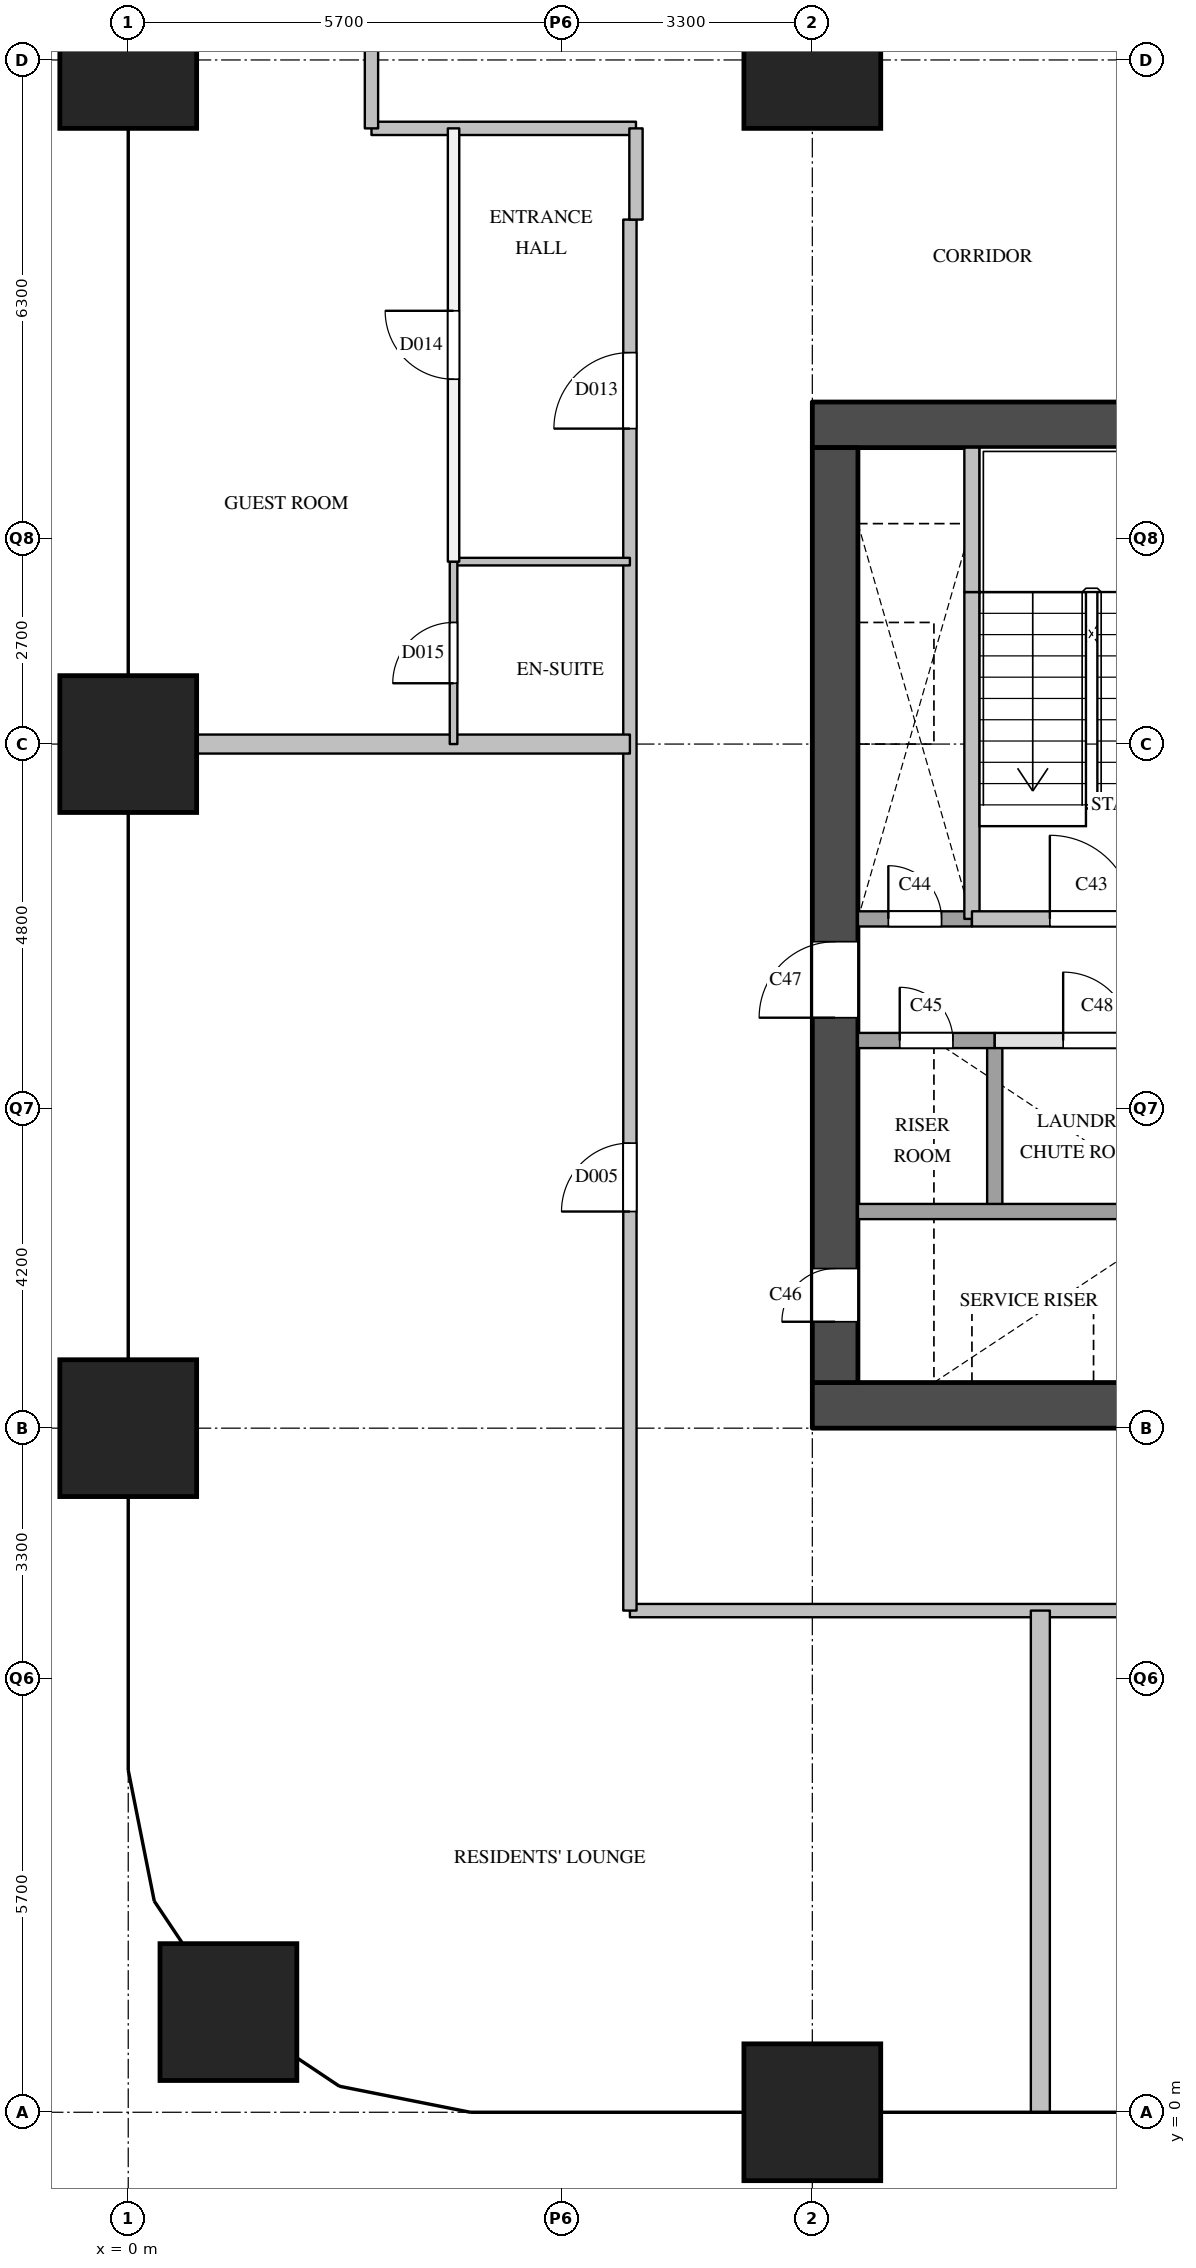
"""IFC4 building model, lengths in metres.
Left out: names, types, materials, properties, quantities, classifications, styles, units other than length and angle.
Written with IfcOpenShell. Run it as: python <this file> out.ifc"""

import sys

from ifc_helpers import new_model, si_unit, direction, frame, frame_2d, origin, origin_2d, place, context, subcontext, project, spatial, rectangle, extrude, element, fill, save


model = new_model("IFC4")
c1 = context("Model", 3, precision=1e-05, world=origin(), true_north=direction((0.0, 1.0)))
c2 = subcontext(c1, "Body", "Model", "MODEL_VIEW")
j1 = project(units=[si_unit("LENGTHUNIT", "METRE"), si_unit("PLANEANGLEUNIT", "RADIAN")], contexts=[c1])
p1 = place(None, origin())
s1 = spatial("IfcSite", under=j1, at=p1, CompositionType="ELEMENT")
p2 = place(p1, origin())
s2 = spatial("IfcBuilding", under=s1, at=p2, CompositionType="ELEMENT")
p3 = place(p2, frame((0.0, 0.0, 65.2)))
s3 = spatial("IfcBuildingStorey", under=s2, at=p3, CompositionType="ELEMENT", Elevation=65.2)
for number, where, z_axis, x_axis in (
    (1, (1.318, 1.318, 0.0), (0.0, 0.0, 1.0), (1.0, 0.0, 0.0)),
    (2, (0.0, 9.0, 0.0), (0.0, 0.0, 1.0), (1.0, 0.0, 0.0)),
    (3, (0.0, 18.0, 0.0), (0.0, 0.0, 1.0), (1.0, 0.0, 0.0)),
    (4, (0.0, 27.0, 0.0), (0.0, 0.0, 1.0), (1.0, 0.0, 0.0)),
    (5, (9.0, 0.0, 0.0), (0.0, 0.0, 1.0), (1.0, 0.0, 0.0)),
    (6, (9.0, 27.0, 0.0), (0.0, 0.0, 1.0), (1.0, 0.0, 0.0)),
):
    element("IfcColumn", number, at=place(p3, frame(where, z_axis=z_axis, x_axis=x_axis)), inside=s3, PredefinedType="COLUMN", context=c2, shape_type="SweptSolid", body=[
        extrude(rectangle(XDim=1.8, YDim=1.8, at=origin_2d()), origin(), (0.0, 0.0, 1.0), 3.8),
    ])
for number, where, z_axis, x_axis in (
    (7, (9.0, 9.3, 0.0), (0.0, 0.0, 1.0), (1.0, 0.0, 0.0)),
    (8, (9.0, 22.2, 0.0), (0.0, 0.0, 1.0), (1.0, 0.0, 0.0)),
):
    element("IfcWall", number, at=place(p3, frame(where, z_axis=z_axis, x_axis=x_axis)), inside=s3, PredefinedType="SHEAR", context=c2, shape_type="SweptSolid", body=[
        extrude(rectangle(XDim=9.0, YDim=0.6, at=frame_2d((4.5, 0.0))), origin(), (0.0, 0.0, 1.0), 3.5),
    ])
p4 = place(p3, frame((9.3, 9.6, 0.0), z_axis=(0.0, 0.0, 1.0), x_axis=(0.0, 1.0, 0.0)))
e9 = element("IfcWall", 9, at=p4, inside=s3, PredefinedType="SHEAR", context=c2, shape_type="SweptSolid", body=[
    extrude(rectangle(XDim=12.3, YDim=0.6, at=frame_2d((6.15, 0.0))), origin(), (0.0, 0.0, 1.0), 3.5),
])
p5 = place(p4, frame((0.8, 0.0, 0.0)))
e10 = element("IfcOpeningElement", 10, at=p5, cuts=e9, PredefinedType="OPENING", context=c2, shape_type="SweptSolid", body=[
    extrude(rectangle(XDim=0.7, YDim=2.1, at=frame_2d((0.35, 1.05))), frame((0.0, 0.31, 0.0), z_axis=(0.0, -1.0, 0.0), x_axis=(1.0, 0.0, 0.0)), (0.0, 0.0, 1.0), 0.62),
])
p6 = place(p4, frame((4.8, 0.0, 0.0)))
e11 = element("IfcOpeningElement", 11, at=p6, cuts=e9, PredefinedType="OPENING", context=c2, shape_type="SweptSolid", body=[
    extrude(rectangle(XDim=1.0, YDim=2.1, at=frame_2d((0.5, 1.05))), frame((0.0, 0.31, 0.0), z_axis=(0.0, -1.0, 0.0), x_axis=(1.0, 0.0, 0.0)), (0.0, 0.0, 1.0), 0.62),
])
p7 = place(p3, frame((11.1, 15.7, 0.0), z_axis=(0.0, 0.0, 1.0), x_axis=(0.0, 1.0, 0.0)))
e12 = element("IfcWall", 12, at=p7, inside=s3, PredefinedType="SOLIDWALL", context=c2, shape_type="SweptSolid", body=[
    extrude(rectangle(XDim=4.3, YDim=0.2, at=frame_2d((2.15, 0.0))), origin(), (0.0, 0.0, 1.0), 3.5),
])
p8 = place(p3, frame((11.1, 20.0, 0.0), z_axis=(0.0, 0.0, 1.0), x_axis=(0.0, 1.0, 0.0)))
e13 = element("IfcWall", 13, at=p8, inside=s3, PredefinedType="SOLIDWALL", context=c2, shape_type="SweptSolid", body=[
    extrude(rectangle(XDim=1.9, YDim=0.2, at=frame_2d((0.95, 0.0))), origin(), (0.0, 0.0, 1.0), 3.5),
])
p9 = place(p3, frame((11.4, 11.9, 0.0), z_axis=(0.0, 0.0, 1.0), x_axis=(0.0, 1.0, 0.0)))
e14 = element("IfcWall", 14, at=p9, inside=s3, PredefinedType="SOLIDWALL", context=c2, shape_type="SweptSolid", body=[
    extrude(rectangle(XDim=2.2, YDim=0.2, at=frame_2d((1.1, 0.0))), origin(), (0.0, 0.0, 1.0), 3.5),
])
p10 = place(p3, frame((9.6, 11.85, 0.0), z_axis=(0.0, 0.0, 1.0), x_axis=(1.0, 0.0, 0.0)))
e15 = element("IfcWall", 15, at=p10, inside=s3, PredefinedType="SOLIDWALL", context=c2, shape_type="SweptSolid", body=[
    extrude(rectangle(XDim=7.8, YDim=0.2, at=frame_2d((3.9, 0.0))), origin(), (0.0, 0.0, 1.0), 3.5),
])
p11 = place(p3, frame((11.4, 14.1, 0.0), z_axis=(0.0, 0.0, 1.0), x_axis=(1.0, 0.0, 0.0)))
e16 = element("IfcWall", 16, at=p11, inside=s3, PredefinedType="PARTITIONING", context=c2, shape_type="SweptSolid", body=[
    extrude(rectangle(XDim=6.0, YDim=0.2, at=frame_2d((3.0, 0.0))), origin(), (0.0, 0.0, 1.0), 3.5),
])
p12 = place(p11, frame((0.9, 0.0, 0.0)))
e17 = element("IfcOpeningElement", 17, at=p12, cuts=e16, PredefinedType="OPENING", context=c2, shape_type="SweptSolid", body=[
    extrude(rectangle(XDim=0.9, YDim=2.1, at=frame_2d((0.45, 1.05))), frame((0.0, 0.11, 0.0), z_axis=(0.0, -1.0, 0.0), x_axis=(1.0, 0.0, 0.0)), (0.0, 0.0, 1.0), 0.22),
])
p13 = place(p11, frame((3.9, 0.0, 0.0)))
e18 = element("IfcOpeningElement", 18, at=p13, cuts=e16, PredefinedType="OPENING", context=c2, shape_type="SweptSolid", body=[
    extrude(rectangle(XDim=0.9, YDim=2.1, at=frame_2d((0.45, 1.05))), frame((0.0, 0.11, 0.0), z_axis=(0.0, -1.0, 0.0), x_axis=(1.0, 0.0, 0.0)), (0.0, 0.0, 1.0), 0.22),
])
p14 = place(p3, frame((9.6, 14.1, 0.0), z_axis=(0.0, 0.0, 1.0), x_axis=(1.0, 0.0, 0.0)))
e19 = element("IfcWall", 19, at=p14, inside=s3, PredefinedType="SOLIDWALL", context=c2, shape_type="SweptSolid", body=[
    extrude(rectangle(XDim=1.8, YDim=0.2, at=frame_2d((0.9, 0.0))), origin(), (0.0, 0.0, 1.0), 3.5),
])
p15 = place(p14, frame((0.55, 0.0, 0.0)))
e20 = element("IfcOpeningElement", 20, at=p15, cuts=e19, PredefinedType="OPENING", context=c2, shape_type="SweptSolid", body=[
    extrude(rectangle(XDim=0.7, YDim=2.1, at=frame_2d((0.35, 1.05))), frame((0.0, 0.11, 0.0), z_axis=(0.0, -1.0, 0.0), x_axis=(1.0, 0.0, 0.0)), (0.0, 0.0, 1.0), 0.22),
])
p16 = place(p3, frame((9.6, 15.7, 0.0), z_axis=(0.0, 0.0, 1.0), x_axis=(1.0, 0.0, 0.0)))
e21 = element("IfcWall", 21, at=p16, inside=s3, PredefinedType="SOLIDWALL", context=c2, shape_type="SweptSolid", body=[
    extrude(rectangle(XDim=1.5, YDim=0.2, at=frame_2d((0.75, 0.0))), origin(), (0.0, 0.0, 1.0), 3.5),
])
p17 = place(p16, frame((0.4, 0.0, 0.0)))
e22 = element("IfcOpeningElement", 22, at=p17, cuts=e21, PredefinedType="OPENING", context=c2, shape_type="SweptSolid", body=[
    extrude(rectangle(XDim=0.7, YDim=2.1, at=frame_2d((0.35, 1.05))), frame((0.0, 0.11, 0.0), z_axis=(0.0, -1.0, 0.0), x_axis=(1.0, 0.0, 0.0)), (0.0, 0.0, 1.0), 0.22),
])
p18 = place(p3, frame((11.1, 15.7, 0.0), z_axis=(0.0, 0.0, 1.0), x_axis=(1.0, 0.0, 0.0)))
e23 = element("IfcWall", 23, at=p18, inside=s3, PredefinedType="SOLIDWALL", context=c2, shape_type="SweptSolid", body=[
    extrude(rectangle(XDim=6.3, YDim=0.2, at=frame_2d((3.15, 0.0))), origin(), (0.0, 0.0, 1.0), 3.5),
])
p19 = place(p18, frame((4.175, 0.0, 0.0)))
e24 = element("IfcOpeningElement", 24, at=p19, cuts=e23, PredefinedType="OPENING", context=c2, shape_type="SweptSolid", body=[
    extrude(rectangle(XDim=1.1, YDim=2.1, at=frame_2d((0.55, 1.05))), frame((0.0, 0.11, 0.0), z_axis=(0.0, -1.0, 0.0), x_axis=(1.0, 0.0, 0.0)), (0.0, 0.0, 1.0), 0.22),
])
p20 = place(p18, frame((1.025, 0.0, 0.0)))
e25 = element("IfcOpeningElement", 25, at=p20, cuts=e23, PredefinedType="OPENING", context=c2, shape_type="SweptSolid", body=[
    extrude(rectangle(XDim=1.1, YDim=2.1, at=frame_2d((0.55, 1.05))), frame((0.0, 0.11, 0.0), z_axis=(0.0, -1.0, 0.0), x_axis=(1.0, 0.0, 0.0)), (0.0, 0.0, 1.0), 0.22),
])
p21 = place(p3, frame((6.6, 6.6, 0.0), z_axis=(0.0, 0.0, 1.0), x_axis=(1.0, 0.0, 0.0)))
e26 = element("IfcWall", 26, at=p21, inside=s3, PredefinedType="PARTITIONING", context=c2, shape_type="SweptSolid", body=[
    extrude(rectangle(XDim=13.8, YDim=0.175, at=frame_2d((6.9, 0.0))), origin(), (0.0, 0.0, 1.0), 3.5),
])
p22 = place(p3, frame((6.6, 24.9, 0.0), z_axis=(0.0, 0.0, 1.0), x_axis=(1.0, 0.0, 0.0)))
e27 = element("IfcWall", 27, at=p22, inside=s3, PredefinedType="PARTITIONING", context=c2, shape_type="SweptSolid", body=[
    extrude(rectangle(XDim=0.08, YDim=0.175, at=frame_2d((0.04, 0.0))), origin(), (0.0, 0.0, 1.0), 3.5),
])
p23 = place(p3, frame((3.2, 26.1, 0.0), z_axis=(0.0, 0.0, 1.0), x_axis=(1.0, 0.0, 0.0)))
e28 = element("IfcWall", 28, at=p23, inside=s3, PredefinedType="PARTITIONING", context=c2, shape_type="SweptSolid", body=[
    extrude(rectangle(XDim=3.48, YDim=0.175, at=frame_2d((1.74, 0.0))), origin(), (0.0, 0.0, 1.0), 3.5),
])
p24 = place(p3, frame((3.2, 26.1, 0.0), z_axis=(0.0, 0.0, 1.0), x_axis=(0.0, 1.0, 0.0)))
e29 = element("IfcWall", 29, at=p24, inside=s3, PredefinedType="PARTITIONING", context=c2, shape_type="SweptSolid", body=[
    extrude(rectangle(XDim=26.3, YDim=0.175, at=frame_2d((13.15, 0.0))), origin(), (0.0, 0.0, 1.0), 2.5),
])
p25 = place(p24, frame((6.4, 0.0, 0.0)))
e30 = element("IfcOpeningElement", 30, at=p25, cuts=e29, PredefinedType="OPENING", context=c2, shape_type="SweptSolid", body=[
    extrude(rectangle(XDim=1.0, YDim=2.1, at=frame_2d((0.5, 1.05))), frame((0.0, 0.097, 0.0), z_axis=(0.0, -1.0, 0.0), x_axis=(1.0, 0.0, 0.0)), (0.0, 0.0, 1.0), 0.195),
])
p26 = place(p24, frame((17.65, 0.0, 0.0)))
e31 = element("IfcOpeningElement", 31, at=p26, cuts=e29, PredefinedType="OPENING", context=c2, shape_type="SweptSolid", body=[
    extrude(rectangle(XDim=0.9, YDim=2.1, at=frame_2d((0.45, 1.05))), frame((0.0, 0.097, 0.0), z_axis=(0.0, -1.0, 0.0), x_axis=(1.0, 0.0, 0.0)), (0.0, 0.0, 1.0), 0.195),
])
p27 = place(p3, frame((6.6, 6.6, 0.0), z_axis=(0.0, 0.0, 1.0), x_axis=(0.0, 1.0, 0.0)))
e32 = element("IfcWall", 32, at=p27, inside=s3, PredefinedType="PARTITIONING", context=c2, shape_type="SweptSolid", body=[
    extrude(rectangle(XDim=18.3, YDim=0.175, at=frame_2d((9.15, 0.0))), origin(), (0.0, 0.0, 1.0), 3.5),
])
p28 = place(p27, frame((5.25, 0.0, 0.0)))
e33 = element("IfcOpeningElement", 33, at=p28, cuts=e32, PredefinedType="OPENING", context=c2, shape_type="SweptSolid", body=[
    extrude(rectangle(XDim=0.9, YDim=2.1, at=frame_2d((0.45, 1.05))), frame((0.0, 0.097, 0.0), z_axis=(0.0, -1.0, 0.0), x_axis=(1.0, 0.0, 0.0)), (0.0, 0.0, 1.0), 0.195),
])
p29 = place(p27, frame((15.55, 0.0, 0.0)))
e34 = element("IfcOpeningElement", 34, at=p29, cuts=e32, PredefinedType="OPENING", context=c2, shape_type="SweptSolid", body=[
    extrude(rectangle(XDim=1.0, YDim=2.1, at=frame_2d((0.5, 1.05))), frame((0.0, 0.097, 0.0), z_axis=(0.0, -1.0, 0.0), x_axis=(1.0, 0.0, 0.0)), (0.0, 0.0, 1.0), 0.195),
])
p30 = place(p3, frame((6.68, 24.9, 0.0), z_axis=(0.0, 0.0, 1.0), x_axis=(0.0, 1.0, 0.0)))
e35 = element("IfcWall", 35, at=p30, inside=s3, PredefinedType="PARTITIONING", context=c2, shape_type="SweptSolid", body=[
    extrude(rectangle(XDim=1.2, YDim=0.175, at=frame_2d((0.6, 0.0))), origin(), (0.0, 0.0, 1.0), 3.5),
])
p31 = place(p3, frame((4.28, 20.4, 0.0), z_axis=(0.0, 0.0, 1.0), x_axis=(0.0, 1.0, 0.0)))
e36 = element("IfcWall", 36, at=p31, inside=s3, PredefinedType="PARTITIONING", context=c2, shape_type="SweptSolid", body=[
    extrude(rectangle(XDim=5.7, YDim=0.15, at=frame_2d((2.85, 0.0))), origin(), (0.0, 0.0, 1.0), 3.5),
])
p32 = place(p31, frame((2.4, 0.0, 0.0)))
e37 = element("IfcOpeningElement", 37, at=p32, cuts=e36, PredefinedType="OPENING", context=c2, shape_type="SweptSolid", body=[
    extrude(rectangle(XDim=0.9, YDim=2.1, at=frame_2d((0.45, 1.05))), frame((0.0, 0.085, 0.0), z_axis=(0.0, -1.0, 0.0), x_axis=(1.0, 0.0, 0.0)), (0.0, 0.0, 1.0), 0.17),
])
p33 = place(p3, frame((0.0, 18.0, 0.0), z_axis=(0.0, 0.0, 1.0), x_axis=(1.0, 0.0, 0.0)))
e38 = element("IfcWall", 38, at=p33, inside=s3, PredefinedType="PARTITIONING", context=c2, shape_type="SweptSolid", body=[
    extrude(rectangle(XDim=6.6, YDim=0.25, at=frame_2d((3.3, 0.0))), origin(), (0.0, 0.0, 1.0), 3.5),
])
p34 = place(p3, frame((12.0, 0.0, 0.0), z_axis=(0.0, 0.0, 1.0), x_axis=(0.0, 1.0, 0.0)))
e39 = element("IfcWall", 39, at=p34, inside=s3, PredefinedType="PARTITIONING", context=c2, shape_type="SweptSolid", body=[
    extrude(rectangle(XDim=6.6, YDim=0.25, at=frame_2d((3.3, 0.0))), origin(), (0.0, 0.0, 1.0), 2.5),
])
p35 = place(p3, frame((4.28, 20.4, 0.0), z_axis=(0.0, 0.0, 1.0), x_axis=(1.0, 0.0, 0.0)))
e40 = element("IfcWall", 40, at=p35, inside=s3, PredefinedType="PARTITIONING", context=c2, shape_type="SweptSolid", body=[
    extrude(rectangle(XDim=2.32, YDim=0.1, at=frame_2d((1.16, 0.0))), origin(), (0.0, 0.0, 1.0), 3.5),
])
p36 = place(p3, frame((4.28, 18.0, 0.0), z_axis=(0.0, 0.0, 1.0), x_axis=(0.0, 1.0, 0.0)))
e41 = element("IfcWall", 41, at=p36, inside=s3, PredefinedType="PARTITIONING", context=c2, shape_type="SweptSolid", body=[
    extrude(rectangle(XDim=2.4, YDim=0.1, at=frame_2d((1.2, 0.0))), origin(), (0.0, 0.0, 1.0), 3.5),
])
p37 = place(p36, frame((0.8, 0.0, 0.0)))
e42 = element("IfcOpeningElement", 42, at=p37, cuts=e41, PredefinedType="OPENING", context=c2, shape_type="SweptSolid", body=[
    extrude(rectangle(XDim=0.8, YDim=2.1, at=frame_2d((0.4, 1.05))), frame((0.0, 0.06, 0.0), z_axis=(0.0, -1.0, 0.0), x_axis=(1.0, 0.0, 0.0)), (0.0, 0.0, 1.0), 0.12),
])
p38 = place(p20, origin())
e43 = element("IfcDoor", 43, at=p38, inside=s3, OperationType="SINGLE_SWING_LEFT", PredefinedType="DOOR", context=c2, shape_type="SweptSolid", body=[
    extrude(rectangle(XDim=1.1, YDim=2.1, at=frame_2d((0.55, 1.05))), frame((0.0, 0.025, 0.0), z_axis=(0.0, -1.0, 0.0), x_axis=(1.0, 0.0, 0.0)), (0.0, 0.0, 1.0), 0.05),
])
fill(e25, e43)
p39 = place(p17, origin())
e44 = element("IfcDoor", 44, at=p39, inside=s3, OperationType="SINGLE_SWING_LEFT", PredefinedType="DOOR", context=c2, shape_type="SweptSolid", body=[
    extrude(rectangle(XDim=0.7, YDim=2.1, at=frame_2d((0.35, 1.05))), frame((0.0, 0.025, 0.0), z_axis=(0.0, -1.0, 0.0), x_axis=(1.0, 0.0, 0.0)), (0.0, 0.0, 1.0), 0.05),
])
fill(e22, e44)
p40 = place(p15, origin())
e45 = element("IfcDoor", 45, at=p40, inside=s3, OperationType="SINGLE_SWING_LEFT", PredefinedType="DOOR", context=c2, shape_type="SweptSolid", body=[
    extrude(rectangle(XDim=0.7, YDim=2.1, at=frame_2d((0.35, 1.05))), frame((0.0, 0.025, 0.0), z_axis=(0.0, -1.0, 0.0), x_axis=(1.0, 0.0, 0.0)), (0.0, 0.0, 1.0), 0.05),
])
fill(e20, e45)
p41 = place(p5, origin())
e46 = element("IfcDoor", 46, at=p41, inside=s3, OperationType="SINGLE_SWING_LEFT", PredefinedType="DOOR", context=c2, shape_type="SweptSolid", body=[
    extrude(rectangle(XDim=0.7, YDim=2.1, at=frame_2d((0.35, 1.05))), frame((0.0, 0.025, 0.0), z_axis=(0.0, -1.0, 0.0), x_axis=(1.0, 0.0, 0.0)), (0.0, 0.0, 1.0), 0.05),
])
fill(e10, e46)
p42 = place(p6, origin())
e47 = element("IfcDoor", 47, at=p42, inside=s3, OperationType="SINGLE_SWING_LEFT", PredefinedType="DOOR", context=c2, shape_type="SweptSolid", body=[
    extrude(rectangle(XDim=1.0, YDim=2.1, at=frame_2d((0.5, 1.05))), frame((0.0, 0.025, 0.0), z_axis=(0.0, -1.0, 0.0), x_axis=(1.0, 0.0, 0.0)), (0.0, 0.0, 1.0), 0.05),
])
fill(e11, e47)
p43 = place(p12, origin())
e48 = element("IfcDoor", 48, at=p43, inside=s3, OperationType="SINGLE_SWING_LEFT", PredefinedType="DOOR", context=c2, shape_type="SweptSolid", body=[
    extrude(rectangle(XDim=0.9, YDim=2.1, at=frame_2d((0.45, 1.05))), frame((0.0, 0.025, 0.0), z_axis=(0.0, -1.0, 0.0), x_axis=(1.0, 0.0, 0.0)), (0.0, 0.0, 1.0), 0.05),
])
fill(e17, e48)
p44 = place(p28, origin())
e49 = element("IfcDoor", 49, at=p44, inside=s3, OperationType="SINGLE_SWING_LEFT", PredefinedType="DOOR", context=c2, shape_type="SweptSolid", body=[
    extrude(rectangle(XDim=0.9, YDim=2.1, at=frame_2d((0.45, 1.05))), frame((0.0, 0.025, 0.0), z_axis=(0.0, -1.0, 0.0), x_axis=(1.0, 0.0, 0.0)), (0.0, 0.0, 1.0), 0.05),
])
fill(e33, e49)
p45 = place(p29, origin())
e50 = element("IfcDoor", 50, at=p45, inside=s3, OperationType="SINGLE_SWING_LEFT", PredefinedType="DOOR", context=c2, shape_type="SweptSolid", body=[
    extrude(rectangle(XDim=1.0, YDim=2.1, at=frame_2d((0.5, 1.05))), frame((0.0, 0.025, 0.0), z_axis=(0.0, -1.0, 0.0), x_axis=(1.0, 0.0, 0.0)), (0.0, 0.0, 1.0), 0.05),
])
fill(e34, e50)
p46 = place(p32, origin())
e51 = element("IfcDoor", 51, at=p46, inside=s3, OperationType="SINGLE_SWING_RIGHT", PredefinedType="DOOR", context=c2, shape_type="SweptSolid", body=[
    extrude(rectangle(XDim=0.9, YDim=2.1, at=frame_2d((0.45, 1.05))), frame((0.0, 0.025, 0.0), z_axis=(0.0, -1.0, 0.0), x_axis=(1.0, 0.0, 0.0)), (0.0, 0.0, 1.0), 0.05),
])
fill(e37, e51)
p47 = place(p37, origin())
e52 = element("IfcDoor", 52, at=p47, inside=s3, OperationType="SINGLE_SWING_LEFT", PredefinedType="DOOR", context=c2, shape_type="SweptSolid", body=[
    extrude(rectangle(XDim=0.8, YDim=2.1, at=frame_2d((0.4, 1.05))), frame((0.0, 0.025, 0.0), z_axis=(0.0, -1.0, 0.0), x_axis=(1.0, 0.0, 0.0)), (0.0, 0.0, 1.0), 0.05),
])
fill(e42, e52)
save(model, sys.argv[1])
